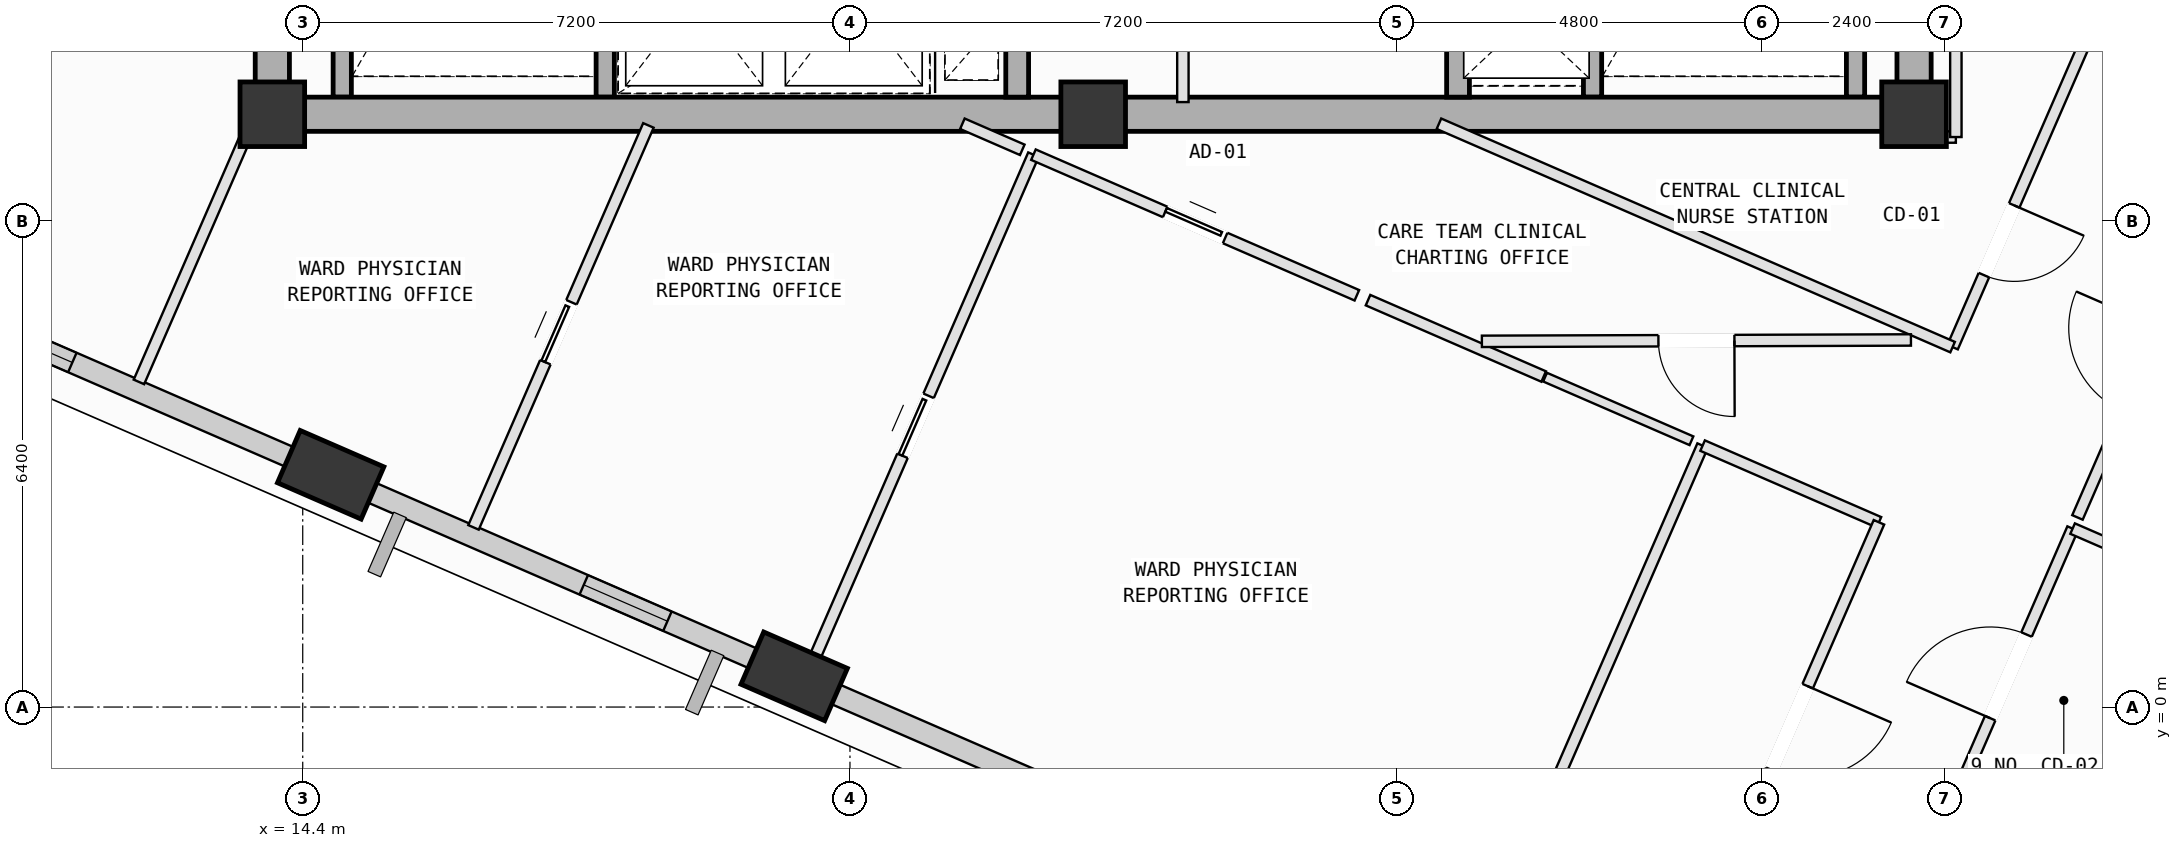
"""IFC4 building model, lengths in metres.
Left out: names, types, materials, properties, quantities, classifications, styles, units other than length and angle.
Written with IfcOpenShell. Run it as: python <this file> out.ifc"""

import sys

from ifc_helpers import new_model, si_unit, direction, frame, frame_2d, origin, origin_2d, place, context, subcontext, project, spatial, rectangle, extrude, element, fill, save


model = new_model("IFC4")
c1 = context("Model", 3, precision=1e-05, world=origin(), true_north=direction((0.0, 1.0)))
c2 = subcontext(c1, "Body", "Model", "MODEL_VIEW")
j1 = project(units=[si_unit("LENGTHUNIT", "METRE"), si_unit("PLANEANGLEUNIT", "RADIAN")], contexts=[c1])
p1 = place(None, origin())
s1 = spatial("IfcSite", under=j1, at=p1, CompositionType="ELEMENT")
p2 = place(p1, origin())
s2 = spatial("IfcBuilding", under=s1, at=p2, CompositionType="ELEMENT")
p3 = place(p2, frame((0.0, 0.0, 320.6)))
s3 = spatial("IfcBuildingStorey", under=s2, at=p3, CompositionType="ELEMENT", Elevation=320.6)
for number, where, z_axis, x_axis in (
    (1, (14.0, 7.8, 0.0), (0.0, 0.0, 1.0), (1.0, 0.0, 0.0)),
    (2, (24.8, 7.8, 0.0), (0.0, 0.0, 1.0), (1.0, 0.0, 0.0)),
    (3, (35.6, 7.8, 0.0), (0.0, 0.0, 1.0), (1.0, 0.0, 0.0)),
):
    element("IfcColumn", number, at=place(p3, frame(where, z_axis=z_axis, x_axis=x_axis)), inside=s3, PredefinedType="COLUMN", context=c2, shape_type="SweptSolid", body=[
        extrude(rectangle(XDim=0.85, YDim=0.85, at=origin_2d()), origin(), (0.0, 0.0, 1.0), 4.0),
    ])
for number, where, z_axis, x_axis in (
    (4, (14.768, 3.056, 0.002), (0.0, 0.0, 1.0), (-0.917, 0.399, 0.0)),
    (5, (20.866, 0.404, 0.002), (0.0, 0.0, 1.0), (-0.917, 0.399, 0.0)),
):
    element("IfcColumn", number, at=place(p3, frame(where, z_axis=z_axis, x_axis=x_axis)), inside=s3, PredefinedType="COLUMN", context=c2, shape_type="SweptSolid", body=[
        extrude(rectangle(XDim=1.2, YDim=0.75, at=origin_2d()), origin(), (0.0, 0.0, 1.0), 3.996),
    ])
p4 = place(p3, frame((14.403, 3.215, 0.0), z_axis=(0.0, 0.0, 1.0), x_axis=(-0.917061363729, 0.398746103624, 0.0)))
e6 = element("IfcWall", 6, at=p4, inside=s3, PredefinedType="SOLIDWALL", context=c2, shape_type="SweptSolid", body=[
    extrude(rectangle(XDim=5.805, YDim=0.28, at=frame_2d((2.902, 0.0))), origin(), (0.0, 0.0, 1.0), 3.265),
])
p5 = place(p4, frame((3.309, 0.0, 0.75)))
e7 = element("IfcOpeningElement", 7, at=p5, cuts=e6, PredefinedType="OPENING", context=c2, shape_type="SweptSolid", body=[
    extrude(rectangle(XDim=1.8, YDim=2.05, at=frame_2d((0.9, 1.025))), frame((0.0, 0.15, 0.0), z_axis=(0.0, -1.0, 0.0), x_axis=(1.0, 0.0, 0.0)), (0.0, 0.0, 1.0), 0.3),
])
p6 = place(p3, frame((20.501, 0.563, 0.0), z_axis=(0.0, 0.0, 1.0), x_axis=(-0.917057460307, 0.39875508084, 0.0)))
e8 = element("IfcWall", 8, at=p6, inside=s3, PredefinedType="SOLIDWALL", context=c2, shape_type="SweptSolid", body=[
    extrude(rectangle(XDim=5.855, YDim=0.28, at=frame_2d((2.927, 0.0))), origin(), (0.0, 0.0, 1.0), 3.265),
])
p7 = place(p6, frame((1.421, 0.0, 0.75)))
e9 = element("IfcOpeningElement", 9, at=p7, cuts=e8, PredefinedType="OPENING", context=c2, shape_type="SweptSolid", body=[
    extrude(rectangle(XDim=1.2, YDim=1.75, at=frame_2d((0.6, 0.875))), frame((0.0, 0.15, 0.0), z_axis=(0.0, -1.0, 0.0), x_axis=(1.0, 0.0, 0.0)), (0.0, 0.0, 1.0), 0.3),
])
p8 = place(p3, frame((28.159, -2.767, 0.0), z_axis=(0.0, 0.0, 1.0), x_axis=(-0.917061321999, 0.398746199597, 0.0)))
e10 = element("IfcWall", 10, at=p8, inside=s3, PredefinedType="SOLIDWALL", context=c2, shape_type="SweptSolid", body=[
    extrude(rectangle(XDim=7.555, YDim=0.28, at=frame_2d((3.777, 0.0))), origin(), (0.0, 0.0, 1.0), 3.265),
])
p9 = place(p8, frame((0.47, 0.0, 0.75)))
e11 = element("IfcOpeningElement", 11, at=p9, cuts=e10, PredefinedType="OPENING", context=c2, shape_type="SweptSolid", body=[
    extrude(rectangle(XDim=1.2, YDim=1.75, at=frame_2d((0.6, 0.875))), frame((0.0, 0.15, 0.0), z_axis=(0.0, -1.0, 0.0), x_axis=(1.0, 0.0, 0.0)), (0.0, 0.0, 1.0), 0.3),
])
for number, where, z_axis, x_axis in (
    (12, (18.38, 15.12, 0.0), (0.0, 0.0, 1.0), (0.0, -1.0, 0.0)),
    (13, (14.92, 8.025, 0.0), (0.0, 0.0, 1.0), (0.0, 1.0, 0.0)),
    (14, (34.83, 15.12, 0.0), (0.0, 0.0, 1.0), (0.0, -1.0, 0.0)),
    (15, (31.37, 8.025, 0.0), (0.0, 0.0, 1.0), (0.0, 1.0, 0.0)),
):
    element("IfcWall", number, at=place(p3, frame(where, z_axis=z_axis, x_axis=x_axis)), inside=s3, PredefinedType="SOLIDWALL", context=c2, shape_type="SweptSolid", body=[
        extrude(rectangle(XDim=7.095, YDim=0.24, at=frame_2d((3.548, 0.0))), origin(), (0.0, 0.0, 1.0), 3.78),
    ])
for number, where, z_axis, x_axis in (
    (16, (14.0, 7.8, 0.0), (0.0, 0.0, 1.0), (1.0, 0.0, 0.0)),
    (17, (24.8, 7.8, 0.0), (0.0, 0.0, 1.0), (1.0, 0.0, 0.0)),
):
    element("IfcWall", number, at=place(p3, frame(where, z_axis=z_axis, x_axis=x_axis)), inside=s3, PredefinedType="SHEAR", context=c2, shape_type="SweptSolid", body=[
        extrude(rectangle(XDim=10.8, YDim=0.45, at=frame_2d((5.4, 0.0))), origin(), (0.0, 0.0, 1.0), 3.78),
    ])
for number, where, z_axis, x_axis in (
    (18, (35.6, 7.8, 0.0), (0.0, 0.0, 1.0), (0.0, 1.0, 0.0)),
    (19, (14.0, 16.8, 0.0), (0.0, 0.0, 1.0), (0.0, -1.0, 0.0)),
):
    element("IfcWall", number, at=place(p3, frame(where, z_axis=z_axis, x_axis=x_axis)), inside=s3, PredefinedType="SHEAR", context=c2, shape_type="SweptSolid", body=[
        extrude(rectangle(XDim=9.0, YDim=0.45, at=frame_2d((4.5, 0.0))), origin(), (0.0, 0.0, 1.0), 3.78),
    ])
p10 = place(p3, frame((23.8, 8.025, 0.0), z_axis=(0.0, 0.0, 1.0), x_axis=(0.0, 1.0, 0.0)))
e20 = element("IfcWall", 20, at=p10, inside=s3, PredefinedType="SOLIDWALL", context=c2, shape_type="SweptSolid", body=[
    extrude(rectangle(XDim=2.655, YDim=0.3, at=frame_2d((1.328, 0.0))), origin(), (0.0, 0.0, 1.0), 3.78),
])
p11 = place(p3, frame((29.6, 8.025, 0.0), z_axis=(0.0, 0.0, 1.0), x_axis=(0.0, 1.0, 0.0)))
e21 = element("IfcWall", 21, at=p11, inside=s3, PredefinedType="SOLIDWALL", context=c2, shape_type="SweptSolid", body=[
    extrude(rectangle(XDim=1.995, YDim=0.3, at=frame_2d((0.998, 0.0))), origin(), (0.0, 0.0, 1.0), 3.78),
])
p12 = place(p3, frame((25.98, 7.96, 0.0), z_axis=(0.0, 0.0, 1.0), x_axis=(0.0, 1.0, 0.0)))
e22 = element("IfcWall", 22, at=p12, inside=s3, PredefinedType="PARTITIONING", context=c2, shape_type="SweptSolid", body=[
    extrude(rectangle(XDim=2.54, YDim=0.15, at=frame_2d((1.27, 0.0))), origin(), (0.0, 0.0, 1.0), 3.78),
])
p13 = place(p12, frame((0.945, 0.0, 0.0)))
e23 = element("IfcOpeningElement", 23, at=p13, cuts=e22, PredefinedType="OPENING", context=c2, shape_type="SweptSolid", body=[
    extrude(rectangle(XDim=1.0, YDim=2.12, at=frame_2d((0.5, 1.06))), frame((0.0, 0.085, 0.0), z_axis=(0.0, -1.0, 0.0), x_axis=(1.0, 0.0, 0.0)), (0.0, 0.0, 1.0), 0.17),
])
p14 = place(p3, frame((35.996, -1.54, 0.0), z_axis=(0.0, 0.0, 1.0), x_axis=(0.398633453706, 0.917110336648, 0.0)))
e24 = element("IfcWall", 24, at=p14, inside=s3, PredefinedType="PARTITIONING", context=c2, shape_type="SweptSolid", body=[
    extrude(rectangle(XDim=4.239, YDim=0.15, at=frame_2d((2.12, 0.0))), origin(), (0.0, 0.0, 1.0), 3.78),
])
p15 = place(p14, frame((1.52, 0.0, 0.0)))
e25 = element("IfcOpeningElement", 25, at=p15, cuts=e24, PredefinedType="OPENING", context=c2, shape_type="SweptSolid", body=[
    extrude(rectangle(XDim=1.2, YDim=2.15, at=frame_2d((0.6, 1.075))), frame((0.0, 0.085, 0.0), z_axis=(0.0, -1.0, 0.0), x_axis=(1.0, 0.0, 0.0)), (0.0, 0.0, 1.0), 0.17),
])
p16 = place(p3, frame((37.686, 2.348, 0.0), z_axis=(0.0, 0.0, 1.0), x_axis=(0.917079517358, -0.398704350167, 0.0)))
e26 = element("IfcWall", 26, at=p16, inside=s3, PredefinedType="PARTITIONING", context=c2, shape_type="SweptSolid", body=[
    extrude(rectangle(XDim=9.436, YDim=0.15, at=frame_2d((4.718, 0.0))), origin(), (0.0, 0.0, 1.0), 3.78),
])
p17 = place(p3, frame((37.75, 2.495, 0.0), z_axis=(0.0, 0.0, 1.0), x_axis=(0.398827178626, 0.917026107365, 0.0)))
e27 = element("IfcWall", 27, at=p17, inside=s3, PredefinedType="PARTITIONING", context=c2, shape_type="SweptSolid", body=[
    extrude(rectangle(XDim=4.24, YDim=0.15, at=frame_2d((2.12, 0.0))), origin(), (0.0, 0.0, 1.0), 3.78),
])
p18 = place(p17, frame((1.52, 0.0, 0.0)))
e28 = element("IfcOpeningElement", 28, at=p18, cuts=e27, PredefinedType="OPENING", context=c2, shape_type="SweptSolid", body=[
    extrude(rectangle(XDim=1.2, YDim=2.15, at=frame_2d((0.6, 1.075))), frame((0.0, 0.085, 0.0), z_axis=(0.0, -1.0, 0.0), x_axis=(1.0, 0.0, 0.0)), (0.0, 0.0, 1.0), 0.17),
])
p19 = place(p3, frame((29.853, -3.378, 0.0), z_axis=(0.0, 0.0, 1.0), x_axis=(0.398816165707, 0.917030896956, 0.0)))
e29 = element("IfcWall", 29, at=p19, inside=s3, PredefinedType="PARTITIONING", context=c2, shape_type="SweptSolid", body=[
    extrude(rectangle(XDim=7.435, YDim=0.15, at=frame_2d((3.717, 0.0))), origin(), (0.0, 0.0, 1.0), 3.78),
])
p20 = place(p3, frame((32.818, 3.44, 0.0), z_axis=(0.0, 0.0, 1.0), x_axis=(0.917010208472, -0.398863733068, 0.0)))
e30 = element("IfcWall", 30, at=p20, inside=s3, PredefinedType="PARTITIONING", context=c2, shape_type="SweptSolid", body=[
    extrude(rectangle(XDim=2.53, YDim=0.15, at=frame_2d((1.265, 0.0))), origin(), (0.0, 0.0, 1.0), 3.78),
])
p21 = place(p3, frame((35.138, 2.431, 0.0), z_axis=(0.0, 0.0, 1.0), x_axis=(-0.398810806125, -0.917033227816, 0.0)))
e31 = element("IfcWall", 31, at=p21, inside=s3, PredefinedType="PARTITIONING", context=c2, shape_type="SweptSolid", body=[
    extrude(rectangle(XDim=5.903, YDim=0.15, at=frame_2d((2.951, 0.0))), origin(), (0.0, 0.0, 1.0), 2.765),
])
p22 = place(p21, frame((2.351, 0.0, 0.0)))
e32 = element("IfcOpeningElement", 32, at=p22, cuts=e31, PredefinedType="OPENING", context=c2, shape_type="SweptSolid", body=[
    extrude(rectangle(XDim=1.2, YDim=2.15, at=frame_2d((0.6, 1.075))), frame((0.0, 0.085, 0.0), z_axis=(0.0, -1.0, 0.0), x_axis=(1.0, 0.0, 0.0)), (0.0, 0.0, 1.0), 0.17),
])
p23 = place(p3, frame((28.416, 5.354, 0.0), z_axis=(0.0, 0.0, 1.0), x_axis=(0.917057734147, -0.398754451062, 0.0)))
e33 = element("IfcWall", 33, at=p23, inside=s3, PredefinedType="PARTITIONING", context=c2, shape_type="SweptSolid", body=[
    extrude(rectangle(XDim=2.52, YDim=0.15, at=frame_2d((1.26, 0.0))), origin(), (0.0, 0.0, 1.0), 3.78),
])
p24 = place(p3, frame((30.745, 4.341, 0.0), z_axis=(0.0, 0.0, 1.0), x_axis=(0.917094083809, -0.398670843481, 0.0)))
e34 = element("IfcWall", 34, at=p24, inside=s3, PredefinedType="PARTITIONING", context=c2, shape_type="SweptSolid", body=[
    extrude(rectangle(XDim=2.1, YDim=0.125, at=frame_2d((1.05, 0.0))), origin(), (0.0, 0.0, 1.0), 3.78),
])
p25 = place(p3, frame((20.912, 0.134, 0.0), z_axis=(0.0, 0.0, 1.0), x_axis=(0.398731849313, 0.917067561493, 0.0)))
e35 = element("IfcWall", 35, at=p25, inside=s3, PredefinedType="PARTITIONING", context=c2, shape_type="SweptSolid", body=[
    extrude(rectangle(XDim=7.779, YDim=0.15, at=frame_2d((3.89, 0.0))), origin(), (0.0, 0.0, 1.0), 2.765),
])
p26 = place(p25, frame((3.46, 0.0, 0.0)))
e36 = element("IfcOpeningElement", 36, at=p26, cuts=e35, PredefinedType="OPENING", context=c2, shape_type="SweptSolid", body=[
    extrude(rectangle(XDim=0.86, YDim=2.06, at=frame_2d((0.43, 1.03))), frame((0.0, 0.085, 0.0), z_axis=(0.0, -1.0, 0.0), x_axis=(1.0, 0.0, 0.0)), (0.0, 0.0, 1.0), 0.17),
])
p27 = place(p3, frame((24.014, 7.268, 0.0), z_axis=(0.0, 0.0, 1.0), x_axis=(0.91706671013, -0.398733807411, 0.0)))
e37 = element("IfcWall", 37, at=p27, inside=s3, PredefinedType="PARTITIONING", context=c2, shape_type="SweptSolid", body=[
    extrude(rectangle(XDim=4.64, YDim=0.15, at=frame_2d((2.32, 0.0))), origin(), (0.0, 0.0, 1.0), 3.78),
])
p28 = place(p27, frame((1.89, 0.0, 0.0)))
e38 = element("IfcOpeningElement", 38, at=p28, cuts=e37, PredefinedType="OPENING", context=c2, shape_type="SweptSolid", body=[
    extrude(rectangle(XDim=0.86, YDim=2.06, at=frame_2d((0.43, 1.03))), frame((0.0, 0.085, 0.0), z_axis=(0.0, -1.0, 0.0), x_axis=(1.0, 0.0, 0.0)), (0.0, 0.0, 1.0), 0.17),
])
p29 = place(p3, frame((16.647, 2.364, 0.0), z_axis=(0.0, 0.0, 1.0), x_axis=(0.398935045973, 0.916979186838, 0.0)))
e39 = element("IfcWall", 39, at=p29, inside=s3, PredefinedType="PARTITIONING", context=c2, shape_type="SweptSolid", body=[
    extrude(rectangle(XDim=5.768, YDim=0.15, at=frame_2d((2.884, 0.0))), origin(), (0.0, 0.0, 1.0), 3.78),
])
p30 = place(p29, frame((2.37, 0.0, 0.0)))
e40 = element("IfcOpeningElement", 40, at=p30, cuts=e39, PredefinedType="OPENING", context=c2, shape_type="SweptSolid", body=[
    extrude(rectangle(XDim=0.86, YDim=2.06, at=frame_2d((0.43, 1.03))), frame((0.0, 0.085, 0.0), z_axis=(0.0, -1.0, 0.0), x_axis=(1.0, 0.0, 0.0)), (0.0, 0.0, 1.0), 0.17),
])
p31 = place(p3, frame((23.079, 7.675, 0.0), z_axis=(0.0, 0.0, 1.0), x_axis=(0.91686666905, -0.399193576082, 0.0)))
e41 = element("IfcWall", 41, at=p31, inside=s3, PredefinedType="PARTITIONING", context=c2, shape_type="SweptSolid", body=[
    extrude(rectangle(XDim=0.859, YDim=0.15, at=frame_2d((0.43, 0.0))), origin(), (0.0, 0.0, 1.0), 3.78),
])
p32 = place(p3, frame((15.04, 2.686, 0.0), z_axis=(0.0, 0.0, 1.0), x_axis=(-0.916649826418, 0.399691250501, 0.0)))
e42 = element("IfcWall", 42, at=p32, inside=s3, PredefinedType="PARTITIONING", context=c2, shape_type="SweptSolid", body=[
    extrude(rectangle(XDim=0.795, YDim=0.15, at=frame_2d((0.398, 0.0))), origin(), (0.0, 0.0, 1.0), 3.265),
])
p33 = place(p3, frame((12.245, 4.278, 0.0), z_axis=(0.0, 0.0, 1.0), x_axis=(0.398841135758, 0.917020037091, 0.0)))
e43 = element("IfcWall", 43, at=p33, inside=s3, PredefinedType="PARTITIONING", context=c2, shape_type="SweptSolid", body=[
    extrude(rectangle(XDim=3.648, YDim=0.15, at=frame_2d((1.824, 0.0))), origin(), (0.0, 0.0, 1.0), 3.78),
])
p34 = place(p3, frame((38.035, 9.17, 0.0), z_axis=(0.0, 0.0, 1.0), x_axis=(-0.398764886009, -0.917053196759, 0.0)))
e44 = element("IfcWall", 44, at=p34, inside=s3, PredefinedType="PARTITIONING", context=c2, shape_type="SweptSolid", body=[
    extrude(rectangle(XDim=4.835, YDim=0.15, at=frame_2d((2.417, 0.0))), origin(), (0.0, 0.0, 1.0), 3.78),
])
p35 = place(p34, frame((2.802, 0.0, 0.0)))
e45 = element("IfcOpeningElement", 45, at=p35, cuts=e44, PredefinedType="OPENING", context=c2, shape_type="SweptSolid", body=[
    extrude(rectangle(XDim=1.0, YDim=2.12, at=frame_2d((0.5, 1.06))), frame((0.0, 0.085, 0.0), z_axis=(0.0, -1.0, 0.0), x_axis=(1.0, 0.0, 0.0)), (0.0, 0.0, 1.0), 0.17),
])
p36 = place(p3, frame((36.107, 4.736, 0.0), z_axis=(0.0, 0.0, 1.0), x_axis=(-0.917031075712, 0.398815754676, 0.0)))
e46 = element("IfcWall", 46, at=p36, inside=s3, PredefinedType="PARTITIONING", context=c2, shape_type="SweptSolid", body=[
    extrude(rectangle(XDim=7.369, YDim=0.15, at=frame_2d((3.685, 0.0))), origin(), (0.0, 0.0, 1.0), 3.78),
])
p37 = place(p3, frame((35.6, 7.5, 0.0), z_axis=(0.0, 0.0, 1.0), x_axis=(1.0, 0.0, 0.0)))
e47 = element("IfcWall", 47, at=p37, inside=s3, PredefinedType="PARTITIONING", context=c2, shape_type="SweptSolid", body=[
    extrude(rectangle(XDim=0.55, YDim=0.15, at=frame_2d((0.275, 0.0))), origin(), (0.0, 0.0, 1.0), 2.765),
])
p38 = place(p3, frame((36.15, 7.5, 0.0), z_axis=(0.0, 0.0, 1.0), x_axis=(0.0, 1.0, 0.0)))
e48 = element("IfcWall", 48, at=p38, inside=s3, PredefinedType="PARTITIONING", context=c2, shape_type="SweptSolid", body=[
    extrude(rectangle(XDim=3.082, YDim=0.15, at=frame_2d((1.541, 0.0))), origin(), (0.0, 0.0, 1.0), 3.78),
])
p39 = place(p3, frame((35.559, 4.83, 0.0), z_axis=(0.0, 0.0, 1.0), x_axis=(-0.999994878711, -0.003200398799, 0.0)))
e49 = element("IfcWall", 49, at=p39, inside=s3, PredefinedType="PARTITIONING", context=c2, shape_type="SweptSolid", body=[
    extrude(rectangle(XDim=5.645, YDim=0.15, at=frame_2d((2.823, 0.0))), origin(), (0.0, 0.0, 1.0), 3.78),
])
p40 = place(p39, frame((2.323, 0.0, 0.0)))
e50 = element("IfcOpeningElement", 50, at=p40, cuts=e49, PredefinedType="OPENING", context=c2, shape_type="SweptSolid", body=[
    extrude(rectangle(XDim=1.0, YDim=2.12, at=frame_2d((0.5, 1.06))), frame((0.0, 0.085, 0.0), z_axis=(0.0, -1.0, 0.0), x_axis=(1.0, 0.0, 0.0)), (0.0, 0.0, 1.0), 0.17),
])
p41 = place(p5, origin())
e51 = element("IfcWindow", 51, at=p41, inside=s3, PartitioningType="SINGLE_PANEL", PredefinedType="WINDOW", context=c2, shape_type="SweptSolid", body=[
    extrude(rectangle(XDim=1.8, YDim=2.05, at=frame_2d((0.9, 1.025))), frame((0.0, 0.03, 0.0), z_axis=(0.0, -1.0, 0.0), x_axis=(1.0, 0.0, 0.0)), (0.0, 0.0, 1.0), 0.06),
])
fill(e7, e51)
p42 = place(p7, origin())
e52 = element("IfcWindow", 52, at=p42, inside=s3, PartitioningType="SINGLE_PANEL", PredefinedType="WINDOW", context=c2, shape_type="SweptSolid", body=[
    extrude(rectangle(XDim=1.2, YDim=1.75, at=frame_2d((0.6, 0.875))), frame((0.0, 0.03, 0.0), z_axis=(0.0, -1.0, 0.0), x_axis=(1.0, 0.0, 0.0)), (0.0, 0.0, 1.0), 0.06),
])
fill(e9, e52)
p43 = place(p15, origin())
e53 = element("IfcDoor", 53, at=p43, inside=s3, OperationType="SINGLE_SWING_LEFT", PredefinedType="DOOR", context=c2, shape_type="SweptSolid", body=[
    extrude(rectangle(XDim=1.2, YDim=2.15, at=frame_2d((0.6, 1.075))), frame((0.0, 0.025, 0.0), z_axis=(0.0, -1.0, 0.0), x_axis=(1.0, 0.0, 0.0)), (0.0, 0.0, 1.0), 0.05),
])
fill(e25, e53)
p44 = place(p22, origin())
e54 = element("IfcDoor", 54, at=p44, inside=s3, OperationType="SINGLE_SWING_LEFT", PredefinedType="DOOR", context=c2, shape_type="SweptSolid", body=[
    extrude(rectangle(XDim=1.2, YDim=2.15, at=frame_2d((0.6, 1.075))), frame((0.0, 0.025, 0.0), z_axis=(0.0, -1.0, 0.0), x_axis=(1.0, 0.0, 0.0)), (0.0, 0.0, 1.0), 0.05),
])
fill(e32, e54)
p45 = place(p35, origin())
e55 = element("IfcDoor", 55, at=p45, inside=s3, OperationType="SINGLE_SWING_LEFT", PredefinedType="DOOR", context=c2, shape_type="SweptSolid", body=[
    extrude(rectangle(XDim=1.0, YDim=2.12, at=frame_2d((0.5, 1.06))), frame((0.0, 0.025, 0.0), z_axis=(0.0, -1.0, 0.0), x_axis=(1.0, 0.0, 0.0)), (0.0, 0.0, 1.0), 0.05),
])
fill(e45, e55)
p46 = place(p40, origin())
e56 = element("IfcDoor", 56, at=p46, inside=s3, OperationType="SINGLE_SWING_LEFT", PredefinedType="DOOR", context=c2, shape_type="SweptSolid", body=[
    extrude(rectangle(XDim=1.0, YDim=2.12, at=frame_2d((0.5, 1.06))), frame((0.0, 0.025, 0.0), z_axis=(0.0, -1.0, 0.0), x_axis=(1.0, 0.0, 0.0)), (0.0, 0.0, 1.0), 0.05),
])
fill(e50, e56)
p47 = place(p28, origin())
e57 = element("IfcDoor", 57, at=p47, inside=s3, OperationType="SLIDING_TO_LEFT", PredefinedType="DOOR", context=c2, shape_type="SweptSolid", body=[
    extrude(rectangle(XDim=0.86, YDim=2.06, at=frame_2d((0.43, 1.03))), frame((0.0, 0.025, 0.0), z_axis=(0.0, -1.0, 0.0), x_axis=(1.0, 0.0, 0.0)), (0.0, 0.0, 1.0), 0.05),
])
fill(e38, e57)
p48 = place(p26, origin())
e58 = element("IfcDoor", 58, at=p48, inside=s3, OperationType="SLIDING_TO_LEFT", PredefinedType="DOOR", context=c2, shape_type="SweptSolid", body=[
    extrude(rectangle(XDim=0.86, YDim=2.06, at=frame_2d((0.43, 1.03))), frame((0.0, 0.025, 0.0), z_axis=(0.0, -1.0, 0.0), x_axis=(1.0, 0.0, 0.0)), (0.0, 0.0, 1.0), 0.05),
])
fill(e36, e58)
p49 = place(p30, origin())
e59 = element("IfcDoor", 59, at=p49, inside=s3, OperationType="SLIDING_TO_LEFT", PredefinedType="DOOR", context=c2, shape_type="SweptSolid", body=[
    extrude(rectangle(XDim=0.86, YDim=2.06, at=frame_2d((0.43, 1.03))), frame((0.0, 0.025, 0.0), z_axis=(0.0, -1.0, 0.0), x_axis=(1.0, 0.0, 0.0)), (0.0, 0.0, 1.0), 0.05),
])
fill(e40, e59)
save(model, sys.argv[1])
